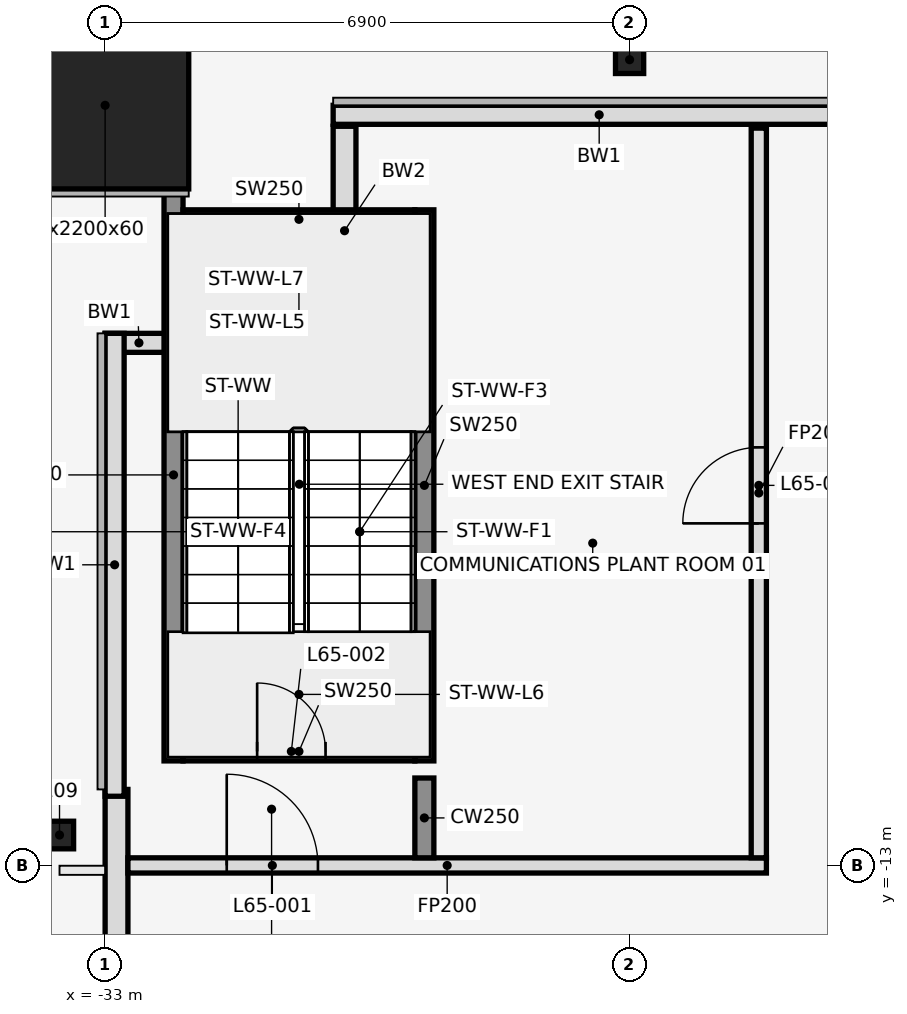
"""IFC4 building model, lengths in metres.
Left out: names, types, materials, properties, quantities, classifications, styles, units other than length and angle.
Written with IfcOpenShell. Run it as: python <this file> out.ifc"""

import sys

from ifc_helpers import new_model, si_unit, direction, frame, frame_2d, origin, origin_2d, place, context, subcontext, project, spatial, rectangle, hollow_rectangle, i_section, extrude, element, fill, save


model = new_model("IFC4")
c1 = context("Model", 3, precision=1e-05, world=origin(), true_north=direction((0.0, 1.0)))
c2 = subcontext(c1, "Body", "Model", "MODEL_VIEW")
j1 = project(units=[si_unit("LENGTHUNIT", "METRE"), si_unit("PLANEANGLEUNIT", "RADIAN")], contexts=[c1])
p1 = place(None, origin())
s1 = spatial("IfcSite", under=j1, at=p1, CompositionType="ELEMENT")
p2 = place(p1, origin())
s2 = spatial("IfcBuilding", under=s1, at=p2, CompositionType="ELEMENT")
p3 = place(p2, frame((0.0, 0.0, 287.6)))
s3 = spatial("IfcBuildingStorey", under=s2, at=p3, CompositionType="ELEMENT", Elevation=287.6)
p4 = place(p3, frame((-33.0, -3.0, 0.0), z_axis=(0.0, 0.0, 1.0), x_axis=(1.0, 0.0, 0.0)))
e1 = element("IfcColumn", 1, at=p4, inside=s3, PredefinedType="COLUMN", context=c2, shape_type="SweptSolid", body=[
    extrude(hollow_rectangle(XDim=2.2, YDim=2.2, WallThickness=0.06, at=origin_2d()), origin(), (0.0, 0.0, 1.0), 5.4),
])
for number, where, z_axis, x_axis in (
    (2, (-26.1, -2.4, 0.0), (0.0, 0.0, 1.0), (1.0, 0.0, 0.0)),
    (3, (-33.6, -12.6, 0.0), (0.0, 0.0, 1.0), (1.0, 0.0, 0.0)),
):
    element("IfcColumn", number, at=place(p3, frame(where, z_axis=z_axis, x_axis=x_axis)), inside=s3, PredefinedType="COLUMN", context=c2, shape_type="SweptSolid", body=[
        extrude(i_section(OverallWidth=0.371, OverallDepth=0.363, WebThickness=0.013, FlangeThickness=0.022, at=origin_2d()), origin(), (0.0, 0.0, 1.0), 5.4),
    ])
p5 = place(p3, frame((-29.85, -3.276, 0.0), z_axis=(0.0, 0.0, 1.0), x_axis=(0.0, -1.0, 0.0)))
e4 = element("IfcWall", 4, at=p5, inside=s3, PredefinedType="STANDARD", context=c2, shape_type="SweptSolid", body=[
    extrude(rectangle(XDim=2.748, YDim=0.3, at=frame_2d((1.374, 0.0))), origin(), (0.0, 0.0, 1.0), 5.25),
])
p6 = place(p3, frame((-32.85, -12.0, 0.0), z_axis=(0.0, 0.0, 1.0), x_axis=(0.0, -1.0, 0.0)))
e5 = element("IfcWall", 5, at=p6, inside=s3, PredefinedType="STANDARD", context=c2, shape_type="SweptSolid", body=[
    extrude(rectangle(XDim=9.328, YDim=0.3, at=frame_2d((4.664, 0.0))), origin(), (0.0, 0.0, 1.0), 4.338),
])
p7 = place(p3, frame((-23.0, -3.125, 0.0), z_axis=(0.0, 0.0, 1.0), x_axis=(-1.0, 0.0, 0.0)))
e6 = element("IfcWall", 6, at=p7, inside=s3, PredefinedType="STANDARD", context=c2, shape_type="SweptSolid", body=[
    extrude(rectangle(XDim=7.0, YDim=0.25, at=frame_2d((3.5, 0.0))), origin(), (0.0, 0.0, 1.0), 5.25),
])
p8 = place(p3, frame((-32.11, -6.125, 0.0), z_axis=(0.0, 0.0, 1.0), x_axis=(-1.0, 0.0, 0.0)))
e7 = element("IfcWall", 7, at=p8, inside=s3, PredefinedType="STANDARD", context=c2, shape_type="SweptSolid", body=[
    extrude(rectangle(XDim=0.89, YDim=0.25, at=frame_2d((0.445, 0.0))), origin(), (0.0, 0.0, 1.0), 5.25),
])
p9 = place(p3, frame((-32.875, -6.0, 0.0), z_axis=(0.0, 0.0, 1.0), x_axis=(0.0, -1.0, 0.0)))
e8 = element("IfcWall", 8, at=p9, inside=s3, PredefinedType="STANDARD", context=c2, shape_type="SweptSolid", body=[
    extrude(rectangle(XDim=6.09, YDim=0.25, at=frame_2d((3.045, 0.0))), origin(), (0.0, 0.0, 1.0), 5.25),
])
p10 = place(p3, frame((-32.1, -11.625, 0.0), z_axis=(0.0, 0.0, 1.0), x_axis=(0.0, 1.0, 0.0)))
e9 = element("IfcWall", 9, at=p10, inside=s3, PredefinedType="SHEAR", context=c2, shape_type="SweptSolid", body=[
    extrude(rectangle(XDim=7.525, YDim=0.25, at=frame_2d((3.762, 0.0))), origin(), (0.0, 0.0, 1.0), 5.4),
])
p11 = place(p3, frame((-28.8, -11.625, 0.0), z_axis=(0.0, 0.0, 1.0), x_axis=(0.0, 1.0, 0.0)))
e10 = element("IfcWall", 10, at=p11, inside=s3, PredefinedType="SHEAR", context=c2, shape_type="SweptSolid", body=[
    extrude(rectangle(XDim=7.25, YDim=0.25, at=frame_2d((3.625, 0.0))), origin(), (0.0, 0.0, 1.0), 5.4),
])
p12 = place(p3, frame((-31.975, -11.5, 0.0), z_axis=(0.0, 0.0, 1.0), x_axis=(1.0, 0.0, 0.0)))
e11 = element("IfcWall", 11, at=p12, inside=s3, PredefinedType="SHEAR", context=c2, shape_type="SweptSolid", body=[
    extrude(rectangle(XDim=3.05, YDim=0.25, at=frame_2d((1.525, 0.0))), origin(), (0.0, 0.0, 1.0), 5.4),
])
p13 = place(p12, frame((0.975, 0.0, 0.0)))
e12 = element("IfcOpeningElement", 12, at=p13, cuts=e11, PredefinedType="OPENING", context=c2, shape_type="SweptSolid", body=[
    extrude(rectangle(XDim=0.9, YDim=2.1, at=frame_2d((0.45, 1.05))), frame((0.0, 0.137, 0.0), z_axis=(0.0, -1.0, 0.0), x_axis=(1.0, 0.0, 0.0)), (0.0, 0.0, 1.0), 0.274),
])
p14 = place(p3, frame((-31.975, -4.5, 0.0), z_axis=(0.0, 0.0, 1.0), x_axis=(1.0, 0.0, 0.0)))
e13 = element("IfcWall", 13, at=p14, inside=s3, PredefinedType="SHEAR", context=c2, shape_type="SweptSolid", body=[
    extrude(rectangle(XDim=3.05, YDim=0.25, at=frame_2d((1.525, 0.0))), origin(), (0.0, 0.0, 1.0), 5.4),
])
p15 = place(p3, frame((-32.7, -13.0, 0.0), z_axis=(0.0, 0.0, 1.0), x_axis=(1.0, 0.0, 0.0)))
e14 = element("IfcWall", 14, at=p15, inside=s3, PredefinedType="PARTITIONING", context=c2, shape_type="SweptSolid", body=[
    extrude(rectangle(XDim=8.4, YDim=0.2, at=frame_2d((4.2, 0.0))), origin(), (0.0, 0.0, 1.0), 4.318),
])
p16 = place(p15, frame((1.3, 0.0, 0.0)))
e15 = element("IfcOpeningElement", 15, at=p16, cuts=e14, PredefinedType="OPENING", context=c2, shape_type="SweptSolid", body=[
    extrude(rectangle(XDim=1.2, YDim=2.1, at=frame_2d((0.6, 1.05))), frame((0.0, 0.112, 0.0), z_axis=(0.0, -1.0, 0.0), x_axis=(1.0, 0.0, 0.0)), (0.0, 0.0, 1.0), 0.224),
])
p17 = place(p3, frame((-28.8, -12.9, 0.0), z_axis=(0.0, 0.0, 1.0), x_axis=(0.0, 1.0, 0.0)))
e16 = element("IfcWall", 16, at=p17, inside=s3, PredefinedType="SHEAR", context=c2, shape_type="SweptSolid", body=[
    extrude(rectangle(XDim=1.05, YDim=0.25, at=frame_2d((0.525, 0.0))), origin(), (0.0, 0.0, 1.0), 5.4),
])
p18 = place(p3, frame((-24.4, -12.9, 0.0), z_axis=(0.0, 0.0, 1.0), x_axis=(0.0, 1.0, 0.0)))
e17 = element("IfcWall", 17, at=p18, inside=s3, PredefinedType="PARTITIONING", context=c2, shape_type="SweptSolid", body=[
    extrude(rectangle(XDim=9.6, YDim=0.2, at=frame_2d((4.8, 0.0))), origin(), (0.0, 0.0, 1.0), 4.318),
])
p19 = place(p18, frame((4.4, 0.0, 0.0)))
e18 = element("IfcOpeningElement", 18, at=p19, cuts=e17, PredefinedType="OPENING", context=c2, shape_type="SweptSolid", body=[
    extrude(rectangle(XDim=1.0, YDim=2.1, at=frame_2d((0.5, 1.05))), frame((0.0, 0.112, 0.0), z_axis=(0.0, -1.0, 0.0), x_axis=(1.0, 0.0, 0.0)), (0.0, 0.0, 1.0), 0.224),
])
p20 = place(p16, origin())
e19 = element("IfcDoor", 19, at=p20, inside=s3, OperationType="SINGLE_SWING_LEFT", PredefinedType="DOOR", context=c2, shape_type="SweptSolid", body=[
    extrude(rectangle(XDim=1.2, YDim=2.1, at=frame_2d((0.6, 1.05))), frame((0.0, 0.025, 0.0), z_axis=(0.0, -1.0, 0.0), x_axis=(1.0, 0.0, 0.0)), (0.0, 0.0, 1.0), 0.05),
])
fill(e15, e19)
p21 = place(p13, origin())
e20 = element("IfcDoor", 20, at=p21, inside=s3, OperationType="SINGLE_SWING_LEFT", PredefinedType="DOOR", context=c2, shape_type="SweptSolid", body=[
    extrude(rectangle(XDim=0.9, YDim=2.1, at=frame_2d((0.45, 1.05))), frame((0.0, 0.025, 0.0), z_axis=(0.0, -1.0, 0.0), x_axis=(1.0, 0.0, 0.0)), (0.0, 0.0, 1.0), 0.05),
])
fill(e12, e20)
p22 = place(p19, origin())
e21 = element("IfcDoor", 21, at=p22, inside=s3, OperationType="SINGLE_SWING_LEFT", PredefinedType="DOOR", context=c2, shape_type="SweptSolid", body=[
    extrude(rectangle(XDim=1.0, YDim=2.1, at=frame_2d((0.5, 1.05))), frame((0.0, 0.025, 0.0), z_axis=(0.0, -1.0, 0.0), x_axis=(1.0, 0.0, 0.0)), (0.0, 0.0, 1.0), 0.05),
])
fill(e18, e21)
save(model, sys.argv[1])
